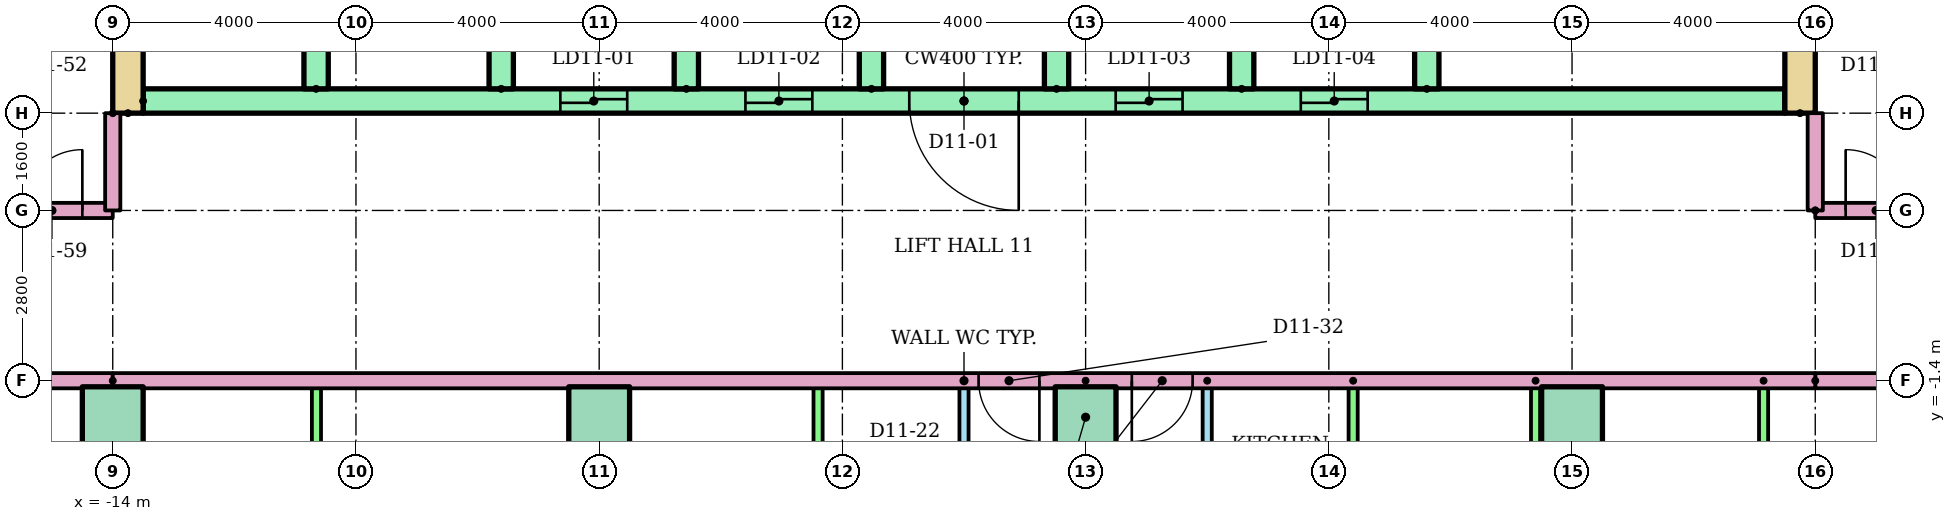
"""IFC4 building model, lengths in metres.
Left out: names, types, materials, properties, quantities, classifications, styles, units other than length and angle.
Written with IfcOpenShell. Run it as: python <this file> out.ifc"""

import sys

from ifc_helpers import new_model, si_unit, direction, frame, frame_2d, origin, origin_2d, place, context, subcontext, project, spatial, rectangle, extrude, element, fill, save


model = new_model("IFC4")
c1 = context("Model", 3, precision=1e-05, world=origin(), true_north=direction((0.0, 1.0)))
c2 = subcontext(c1, "Body", "Model", "MODEL_VIEW")
j1 = project(units=[si_unit("LENGTHUNIT", "METRE"), si_unit("PLANEANGLEUNIT", "RADIAN")], contexts=[c1])
p1 = place(None, origin())
s1 = spatial("IfcSite", under=j1, at=p1, CompositionType="ELEMENT")
p2 = place(p1, origin())
s2 = spatial("IfcBuilding", under=s1, at=p2, CompositionType="ELEMENT")
p3 = place(p2, frame((0.0, 0.0, 44.8)))
s3 = spatial("IfcBuildingStorey", under=s2, at=p3, CompositionType="ELEMENT", Elevation=44.8)
for number, where in (
    (1, (-14.0, -2.0, 0.0)),
    (2, (-6.0, -2.0, 0.0)),
    (3, (2.0, -2.0, 0.0)),
    (4, (10.0, -2.0, 0.0)),
):
    element("IfcColumn", number, at=place(p3, frame(where)), inside=s3, PredefinedType="COLUMN", context=c2, shape_type="SweptSolid", body=[
        extrude(rectangle(XDim=1.0, YDim=1.0, at=origin_2d()), origin(), (0.0, 0.0, 1.0), 3.2),
    ])
for number, where, z_axis, x_axis in (
    (5, (-13.75, 3.0, 0.0), (0.0, 0.0, 1.0), (0.0, 1.0, 0.0)),
    (6, (13.75, 3.0, 0.0), (0.0, 0.0, 1.0), (0.0, 1.0, 0.0)),
):
    element("IfcWall", number, at=place(p3, frame(where, z_axis=z_axis, x_axis=x_axis)), inside=s3, PredefinedType="SHEAR", context=c2, shape_type="SweptSolid", body=[
        extrude(rectangle(XDim=17.0, YDim=0.5, at=frame_2d((8.5, 0.0))), origin(), (0.0, 0.0, 1.0), 2.92),
    ])
p4 = place(p3, frame((-13.5, 3.2, 0.0)))
e7 = element("IfcWall", 7, at=p4, inside=s3, PredefinedType="SHEAR", context=c2, shape_type="SweptSolid", body=[
    extrude(rectangle(XDim=27.0, YDim=0.4, at=frame_2d((13.5, 0.0))), origin(), (0.0, 0.0, 1.0), 2.92),
])
p5 = place(p4, frame((6.861, 0.0, 0.0)))
e8 = element("IfcOpeningElement", 8, at=p5, cuts=e7, PredefinedType="OPENING", context=c2, shape_type="SweptSolid", body=[
    extrude(rectangle(XDim=1.1, YDim=2.1, at=frame_2d((0.55, 1.05))), frame((0.0, 0.21, 0.0), z_axis=(0.0, -1.0, 0.0), x_axis=(1.0, 0.0, 0.0)), (0.0, 0.0, 1.0), 0.42),
])
p6 = place(p4, frame((9.906, 0.0, 0.0)))
e9 = element("IfcOpeningElement", 9, at=p6, cuts=e7, PredefinedType="OPENING", context=c2, shape_type="SweptSolid", body=[
    extrude(rectangle(XDim=1.1, YDim=2.1, at=frame_2d((0.55, 1.05))), frame((0.0, 0.21, 0.0), z_axis=(0.0, -1.0, 0.0), x_axis=(1.0, 0.0, 0.0)), (0.0, 0.0, 1.0), 0.42),
])
p7 = place(p4, frame((15.994, 0.0, 0.0)))
e10 = element("IfcOpeningElement", 10, at=p7, cuts=e7, PredefinedType="OPENING", context=c2, shape_type="SweptSolid", body=[
    extrude(rectangle(XDim=1.1, YDim=2.1, at=frame_2d((0.55, 1.05))), frame((0.0, 0.21, 0.0), z_axis=(0.0, -1.0, 0.0), x_axis=(1.0, 0.0, 0.0)), (0.0, 0.0, 1.0), 0.42),
])
p8 = place(p4, frame((19.039, 0.0, 0.0)))
e11 = element("IfcOpeningElement", 11, at=p8, cuts=e7, PredefinedType="OPENING", context=c2, shape_type="SweptSolid", body=[
    extrude(rectangle(XDim=1.1, YDim=2.1, at=frame_2d((0.55, 1.05))), frame((0.0, 0.21, 0.0), z_axis=(0.0, -1.0, 0.0), x_axis=(1.0, 0.0, 0.0)), (0.0, 0.0, 1.0), 0.42),
])
p9 = place(p4, frame((12.6, 0.0, 0.0)))
e12 = element("IfcOpeningElement", 12, at=p9, cuts=e7, PredefinedType="OPENING", context=c2, shape_type="SweptSolid", body=[
    extrude(rectangle(XDim=1.8, YDim=2.1, at=frame_2d((0.9, 1.05))), frame((0.0, 0.21, 0.0), z_axis=(0.0, -1.0, 0.0), x_axis=(1.0, 0.0, 0.0)), (0.0, 0.0, 1.0), 0.42),
])
for number, where, z_axis, x_axis in (
    (13, (-10.656, 3.4, 0.0), (0.0, 0.0, 1.0), (0.0, 1.0, 0.0)),
    (14, (-7.611, 3.4, 0.0), (0.0, 0.0, 1.0), (0.0, 1.0, 0.0)),
    (15, (-4.567, 3.4, 0.0), (0.0, 0.0, 1.0), (0.0, 1.0, 0.0)),
    (16, (-1.522, 3.4, 0.0), (0.0, 0.0, 1.0), (0.0, 1.0, 0.0)),
    (17, (1.522, 3.4, 0.0), (0.0, 0.0, 1.0), (0.0, 1.0, 0.0)),
    (18, (4.567, 3.4, 0.0), (0.0, 0.0, 1.0), (0.0, 1.0, 0.0)),
    (19, (7.611, 3.4, 0.0), (0.0, 0.0, 1.0), (0.0, 1.0, 0.0)),
):
    element("IfcWall", number, at=place(p3, frame(where, z_axis=z_axis, x_axis=x_axis)), inside=s3, PredefinedType="SHEAR", context=c2, shape_type="SweptSolid", body=[
        extrude(rectangle(XDim=3.0, YDim=0.4, at=frame_2d((1.5, 0.0))), origin(), (0.0, 0.0, 1.0), 2.92),
    ])
p10 = place(p3, frame((0.0, -7.8, 0.0), z_axis=(0.0, 0.0, 1.0), x_axis=(0.0, 1.0, 0.0)))
e20 = element("IfcWall", 20, at=p10, inside=s3, PredefinedType="PARTITIONING", context=c2, shape_type="SweptSolid", body=[
    extrude(rectangle(XDim=6.4, YDim=0.15, at=frame_2d((3.2, 0.0))), origin(), (0.0, 0.0, 1.0), 2.4),
])
p11 = place(p10, frame((4.14, 0.0, 0.0)))
e21 = element("IfcOpeningElement", 21, at=p11, cuts=e20, PredefinedType="OPENING", context=c2, shape_type="SweptSolid", body=[
    extrude(rectangle(XDim=0.9, YDim=2.1, at=frame_2d((0.45, 1.05))), frame((0.0, 0.085, 0.0), z_axis=(0.0, -1.0, 0.0), x_axis=(1.0, 0.0, 0.0)), (0.0, 0.0, 1.0), 0.17),
])
p12 = place(p10, frame((1.05, 0.0, 0.0)))
e22 = element("IfcOpeningElement", 22, at=p12, cuts=e20, PredefinedType="OPENING", context=c2, shape_type="SweptSolid", body=[
    extrude(rectangle(XDim=0.8, YDim=2.1, at=frame_2d((0.4, 1.05))), frame((0.0, 0.085, 0.0), z_axis=(0.0, -1.0, 0.0), x_axis=(1.0, 0.0, 0.0)), (0.0, 0.0, 1.0), 0.17),
])
for number, where, z_axis, x_axis in (
    (23, (-2.4, -7.8, 0.0), (0.0, 0.0, 1.0), (0.0, 1.0, 0.0)),
    (24, (-10.65, -7.8, 0.0), (0.0, 0.0, 1.0), (0.0, 1.0, 0.0)),
):
    element("IfcWall", number, at=place(p3, frame(where, z_axis=z_axis, x_axis=x_axis)), inside=s3, PredefinedType="PARTITIONING", context=c2, shape_type="SweptSolid", body=[
        extrude(rectangle(XDim=6.4, YDim=0.15, at=frame_2d((3.2, 0.0))), origin(), (0.0, 0.0, 1.0), 2.4),
    ])
p13 = place(p3, frame((4.0, -1.4, 0.0), z_axis=(0.0, 0.0, 1.0), x_axis=(0.0, -1.0, 0.0)))
e25 = element("IfcWall", 25, at=p13, inside=s3, PredefinedType="PARTITIONING", context=c2, shape_type="SweptSolid", body=[
    extrude(rectangle(XDim=6.4, YDim=0.15, at=frame_2d((3.2, 0.0))), origin(), (0.0, 0.0, 1.0), 2.4),
])
p14 = place(p13, frame((1.36, 0.0, 0.0)))
e26 = element("IfcOpeningElement", 26, at=p14, cuts=e25, PredefinedType="OPENING", context=c2, shape_type="SweptSolid", body=[
    extrude(rectangle(XDim=0.9, YDim=2.1, at=frame_2d((0.45, 1.05))), frame((0.0, 0.085, 0.0), z_axis=(0.0, -1.0, 0.0), x_axis=(1.0, 0.0, 0.0)), (0.0, 0.0, 1.0), 0.17),
])
p15 = place(p13, frame((4.55, 0.0, 0.0)))
e27 = element("IfcOpeningElement", 27, at=p15, cuts=e25, PredefinedType="OPENING", context=c2, shape_type="SweptSolid", body=[
    extrude(rectangle(XDim=0.8, YDim=2.1, at=frame_2d((0.4, 1.05))), frame((0.0, 0.085, 0.0), z_axis=(0.0, -1.0, 0.0), x_axis=(1.0, 0.0, 0.0)), (0.0, 0.0, 1.0), 0.17),
])
for number, where, z_axis, x_axis in (
    (28, (6.4, -1.4, 0.0), (0.0, 0.0, 1.0), (0.0, -1.0, 0.0)),
    (29, (9.4, -1.4, 0.0), (0.0, 0.0, 1.0), (0.0, -1.0, 0.0)),
    (30, (13.15, -1.4, 0.0), (0.0, 0.0, 1.0), (0.0, -1.0, 0.0)),
):
    element("IfcWall", number, at=place(p3, frame(where, z_axis=z_axis, x_axis=x_axis)), inside=s3, PredefinedType="PARTITIONING", context=c2, shape_type="SweptSolid", body=[
        extrude(rectangle(XDim=6.4, YDim=0.15, at=frame_2d((3.2, 0.0))), origin(), (0.0, 0.0, 1.0), 2.4),
    ])
p16 = place(p3, frame((2.0, -1.4, 0.0), z_axis=(0.0, 0.0, 1.0), x_axis=(0.0, -1.0, 0.0)))
e31 = element("IfcWall", 31, at=p16, inside=s3, PredefinedType="PARTITIONING", context=c2, shape_type="SweptSolid", body=[
    extrude(rectangle(XDim=14.71, YDim=0.25, at=frame_2d((7.355, 0.0))), origin(), (0.0, 0.0, 1.0), 2.4),
])
p17 = place(p3, frame((-14.0, -1.4, 0.0), z_axis=(0.0, 0.0, 1.0), x_axis=(-1.0, 0.0, 0.0)))
e32 = element("IfcWall", 32, at=p17, inside=s3, PredefinedType="PARTITIONING", context=c2, shape_type="SweptSolid", body=[
    extrude(rectangle(XDim=15.0, YDim=0.25, at=frame_2d((7.5, 0.0))), origin(), (0.0, 0.0, 1.0), 2.4),
])
p18 = place(p17, frame((8.76, 0.0, 0.0)))
e33 = element("IfcOpeningElement", 33, at=p18, cuts=e32, PredefinedType="OPENING", context=c2, shape_type="SweptSolid", body=[
    extrude(rectangle(XDim=1.0, YDim=2.1, at=frame_2d((0.5, 1.05))), frame((0.0, 0.135, 0.0), z_axis=(0.0, -1.0, 0.0), x_axis=(1.0, 0.0, 0.0)), (0.0, 0.0, 1.0), 0.27),
])
p19 = place(p3, frame((29.0, -1.4, 0.0), z_axis=(0.0, 0.0, 1.0), x_axis=(-1.0, 0.0, 0.0)))
e34 = element("IfcWall", 34, at=p19, inside=s3, PredefinedType="PARTITIONING", context=c2, shape_type="SweptSolid", body=[
    extrude(rectangle(XDim=15.0, YDim=0.25, at=frame_2d((7.5, 0.0))), origin(), (0.0, 0.0, 1.0), 2.4),
])
p20 = place(p19, frame((9.24, 0.0, 0.0)))
e35 = element("IfcOpeningElement", 35, at=p20, cuts=e34, PredefinedType="OPENING", context=c2, shape_type="SweptSolid", body=[
    extrude(rectangle(XDim=1.0, YDim=2.1, at=frame_2d((0.5, 1.05))), frame((0.0, 0.135, 0.0), z_axis=(0.0, -1.0, 0.0), x_axis=(1.0, 0.0, 0.0)), (0.0, 0.0, 1.0), 0.27),
])
p21 = place(p3, frame((-29.0, 1.4, 0.0)))
e36 = element("IfcWall", 36, at=p21, inside=s3, PredefinedType="PARTITIONING", context=c2, shape_type="SweptSolid", body=[
    extrude(rectangle(XDim=15.0, YDim=0.25, at=frame_2d((7.5, 0.0))), origin(), (0.0, 0.0, 1.0), 2.4),
])
p22 = place(p21, frame((13.5, 0.0, 0.0)))
e37 = element("IfcOpeningElement", 37, at=p22, cuts=e36, PredefinedType="OPENING", context=c2, shape_type="SweptSolid", body=[
    extrude(rectangle(XDim=1.0, YDim=2.1, at=frame_2d((0.5, 1.05))), frame((0.0, 0.135, 0.0), z_axis=(0.0, -1.0, 0.0), x_axis=(1.0, 0.0, 0.0)), (0.0, 0.0, 1.0), 0.27),
])
p23 = place(p3, frame((14.0, 1.4, 0.0)))
e38 = element("IfcWall", 38, at=p23, inside=s3, PredefinedType="PARTITIONING", context=c2, shape_type="SweptSolid", body=[
    extrude(rectangle(XDim=15.0, YDim=0.25, at=frame_2d((7.5, 0.0))), origin(), (0.0, 0.0, 1.0), 2.4),
])
p24 = place(p23, frame((0.5, 0.0, 0.0)))
e39 = element("IfcOpeningElement", 39, at=p24, cuts=e38, PredefinedType="OPENING", context=c2, shape_type="SweptSolid", body=[
    extrude(rectangle(XDim=1.0, YDim=2.1, at=frame_2d((0.5, 1.05))), frame((0.0, 0.135, 0.0), z_axis=(0.0, -1.0, 0.0), x_axis=(1.0, 0.0, 0.0)), (0.0, 0.0, 1.0), 0.27),
])
p25 = place(p23, frame((12.76, 0.0, 0.0)))
e40 = element("IfcOpeningElement", 40, at=p25, cuts=e38, PredefinedType="OPENING", context=c2, shape_type="SweptSolid", body=[
    extrude(rectangle(XDim=1.0, YDim=2.1, at=frame_2d((0.5, 1.05))), frame((0.0, 0.135, 0.0), z_axis=(0.0, -1.0, 0.0), x_axis=(1.0, 0.0, 0.0)), (0.0, 0.0, 1.0), 0.27),
])
p26 = place(p3, frame((14.0, -1.4, 0.0), z_axis=(0.0, 0.0, 1.0), x_axis=(-1.0, 0.0, 0.0)))
e41 = element("IfcWall", 41, at=p26, inside=s3, PredefinedType="PARTITIONING", context=c2, shape_type="SweptSolid", body=[
    extrude(rectangle(XDim=28.0, YDim=0.25, at=frame_2d((14.0, 0.0))), origin(), (0.0, 0.0, 1.0), 2.4),
])
p27 = place(p26, frame((12.76, 0.0, 0.0)))
e42 = element("IfcOpeningElement", 42, at=p27, cuts=e41, PredefinedType="OPENING", context=c2, shape_type="SweptSolid", body=[
    extrude(rectangle(XDim=1.0, YDim=2.1, at=frame_2d((0.5, 1.05))), frame((0.0, 0.135, 0.0), z_axis=(0.0, -1.0, 0.0), x_axis=(1.0, 0.0, 0.0)), (0.0, 0.0, 1.0), 0.27),
])
p28 = place(p26, frame((10.24, 0.0, 0.0)))
e43 = element("IfcOpeningElement", 43, at=p28, cuts=e41, PredefinedType="OPENING", context=c2, shape_type="SweptSolid", body=[
    extrude(rectangle(XDim=1.0, YDim=2.1, at=frame_2d((0.5, 1.05))), frame((0.0, 0.135, 0.0), z_axis=(0.0, -1.0, 0.0), x_axis=(1.0, 0.0, 0.0)), (0.0, 0.0, 1.0), 0.27),
])
for number, where, z_axis, x_axis in (
    (44, (-14.0, 3.0, 0.0), (0.0, 0.0, 1.0), (0.0, -1.0, 0.0)),
    (45, (14.0, 1.4, 0.0), (0.0, 0.0, 1.0), (0.0, 1.0, 0.0)),
):
    element("IfcWall", number, at=place(p3, frame(where, z_axis=z_axis, x_axis=x_axis)), inside=s3, PredefinedType="PARTITIONING", context=c2, shape_type="SweptSolid", body=[
        extrude(rectangle(XDim=1.6, YDim=0.25, at=frame_2d((0.8, 0.0))), origin(), (0.0, 0.0, 1.0), 2.4),
    ])
p29 = place(p5, origin())
e46 = element("IfcDoor", 46, at=p29, inside=s3, OperationType="SLIDING_TO_LEFT", PredefinedType="DOOR", context=c2, shape_type="SweptSolid", body=[
    extrude(rectangle(XDim=1.1, YDim=2.1, at=frame_2d((0.55, 1.05))), frame((0.0, 0.025, 0.0), z_axis=(0.0, -1.0, 0.0), x_axis=(1.0, 0.0, 0.0)), (0.0, 0.0, 1.0), 0.05),
])
fill(e8, e46)
p30 = place(p6, origin())
e47 = element("IfcDoor", 47, at=p30, inside=s3, OperationType="SLIDING_TO_LEFT", PredefinedType="DOOR", context=c2, shape_type="SweptSolid", body=[
    extrude(rectangle(XDim=1.1, YDim=2.1, at=frame_2d((0.55, 1.05))), frame((0.0, 0.025, 0.0), z_axis=(0.0, -1.0, 0.0), x_axis=(1.0, 0.0, 0.0)), (0.0, 0.0, 1.0), 0.05),
])
fill(e9, e47)
p31 = place(p7, origin())
e48 = element("IfcDoor", 48, at=p31, inside=s3, OperationType="SLIDING_TO_LEFT", PredefinedType="DOOR", context=c2, shape_type="SweptSolid", body=[
    extrude(rectangle(XDim=1.1, YDim=2.1, at=frame_2d((0.55, 1.05))), frame((0.0, 0.025, 0.0), z_axis=(0.0, -1.0, 0.0), x_axis=(1.0, 0.0, 0.0)), (0.0, 0.0, 1.0), 0.05),
])
fill(e10, e48)
p32 = place(p8, origin())
e49 = element("IfcDoor", 49, at=p32, inside=s3, OperationType="SLIDING_TO_LEFT", PredefinedType="DOOR", context=c2, shape_type="SweptSolid", body=[
    extrude(rectangle(XDim=1.1, YDim=2.1, at=frame_2d((0.55, 1.05))), frame((0.0, 0.025, 0.0), z_axis=(0.0, -1.0, 0.0), x_axis=(1.0, 0.0, 0.0)), (0.0, 0.0, 1.0), 0.05),
])
fill(e11, e49)
p33 = place(p9, frame((1.8, 0.0, 0.0), z_axis=(0.0, 0.0, 1.0), x_axis=(-1.0, 0.0, 0.0)))
e50 = element("IfcDoor", 50, at=p33, inside=s3, OperationType="DOUBLE_DOOR_SINGLE_SWING", PredefinedType="DOOR", context=c2, shape_type="SweptSolid", body=[
    extrude(rectangle(XDim=1.8, YDim=2.1, at=frame_2d((0.9, 1.05))), frame((0.0, 0.025, 0.0), z_axis=(0.0, -1.0, 0.0), x_axis=(1.0, 0.0, 0.0)), (0.0, 0.0, 1.0), 0.05),
])
fill(e12, e50)
p34 = place(p27, origin())
e51 = element("IfcDoor", 51, at=p34, inside=s3, OperationType="SINGLE_SWING_LEFT", PredefinedType="DOOR", context=c2, shape_type="SweptSolid", body=[
    extrude(rectangle(XDim=1.0, YDim=2.1, at=frame_2d((0.5, 1.05))), frame((0.0, 0.025, 0.0), z_axis=(0.0, -1.0, 0.0), x_axis=(1.0, 0.0, 0.0)), (0.0, 0.0, 1.0), 0.05),
])
fill(e42, e51)
p35 = place(p28, origin())
e52 = element("IfcDoor", 52, at=p35, inside=s3, OperationType="SINGLE_SWING_RIGHT", PredefinedType="DOOR", context=c2, shape_type="SweptSolid", body=[
    extrude(rectangle(XDim=1.0, YDim=2.1, at=frame_2d((0.5, 1.05))), frame((0.0, 0.025, 0.0), z_axis=(0.0, -1.0, 0.0), x_axis=(1.0, 0.0, 0.0)), (0.0, 0.0, 1.0), 0.05),
])
fill(e43, e52)
p36 = place(p22, origin())
e53 = element("IfcDoor", 53, at=p36, inside=s3, OperationType="SINGLE_SWING_RIGHT", PredefinedType="DOOR", context=c2, shape_type="SweptSolid", body=[
    extrude(rectangle(XDim=1.0, YDim=2.1, at=frame_2d((0.5, 1.05))), frame((0.0, 0.025, 0.0), z_axis=(0.0, -1.0, 0.0), x_axis=(1.0, 0.0, 0.0)), (0.0, 0.0, 1.0), 0.05),
])
fill(e37, e53)
p37 = place(p24, origin())
e54 = element("IfcDoor", 54, at=p37, inside=s3, OperationType="SINGLE_SWING_LEFT", PredefinedType="DOOR", context=c2, shape_type="SweptSolid", body=[
    extrude(rectangle(XDim=1.0, YDim=2.1, at=frame_2d((0.5, 1.05))), frame((0.0, 0.025, 0.0), z_axis=(0.0, -1.0, 0.0), x_axis=(1.0, 0.0, 0.0)), (0.0, 0.0, 1.0), 0.05),
])
fill(e39, e54)
save(model, sys.argv[1])
